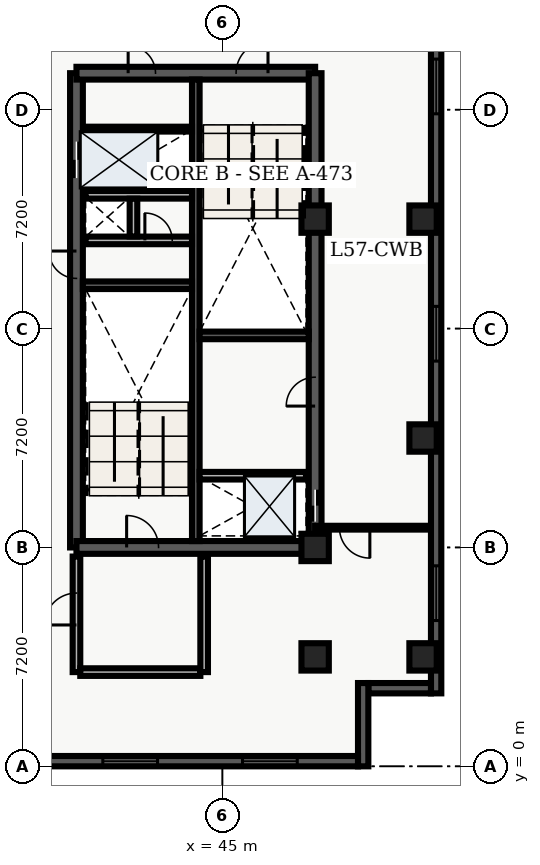
"""IFC4 building model, lengths in metres.
Left out: names, types, materials, properties, quantities, classifications, styles, units other than length and angle.
Written with IfcOpenShell. Run it as: python <this file> out.ifc"""

import sys

from ifc_helpers import new_model, entity, si_unit, converted_unit, direction, frame, origin_with_axes, origin_2d_with_axis, place, context, subcontext, project, spatial, polyline, rectangle, outline, extrude, element, fill, save


model = new_model("IFC4")
c1 = context("Model", 3, precision=1e-05, world=origin_with_axes(), true_north=direction((0.0, 1.0)))
c2 = subcontext(c1, "Body", "Model", "MODEL_VIEW")
j1 = project(units=[si_unit("LENGTHUNIT", "METRE"), converted_unit("PLANEANGLEUNIT", "DEGREE", entity("IfcPlaneAngleMeasure", 0.017), si_unit("PLANEANGLEUNIT", "RADIAN"), dimensions=[0, 0, 0, 0, 0, 0, 0])], contexts=[c1])
p1 = place(None, origin_with_axes())
s1 = spatial("IfcSite", under=j1, at=p1, CompositionType="ELEMENT")
p2 = place(p1, origin_with_axes())
s2 = spatial("IfcBuilding", under=s1, at=p2, CompositionType="ELEMENT")
p3 = place(p2, frame((0.0, 0.0, 232.5), z_axis=(0.0, 0.0, 1.0), x_axis=(1.0, 0.0, 0.0)))
s3 = spatial("IfcBuildingStorey", under=s2, at=p3, CompositionType="ELEMENT", Elevation=232.5)
p4 = place(p3, frame((40.2, 7.2, 0.0), z_axis=(0.0, 0.0, 1.0), x_axis=(0.0, 1.0, 0.0)))
e1 = element("IfcWall", 1, at=p4, inside=s3, PredefinedType="SHEAR", context=c2, shape_type="SweptSolid", body=[
    extrude(outline(polyline([(0.0, -0.21), (15.6, -0.21), (15.6, 0.21), (0.0, 0.21), (0.0, -0.21)])), origin_with_axes(), (0.0, 0.0, 1.0), 3.66),
])
p5 = place(p4, frame((12.75, 0.0, 0.0), z_axis=(0.0, 0.0, 1.0), x_axis=(1.0, 0.0, 0.0)))
e2 = element("IfcOpeningElement", 2, at=p5, cuts=e1, PredefinedType="OPENING", context=c2, shape_type="SweptSolid", body=[
    extrude(rectangle(XDim=1.2, YDim=0.44, at=origin_2d_with_axis()), origin_with_axes(), (0.0, 0.0, 1.0), 2.15),
])
p6 = place(p4, frame((9.3, 0.0, 0.0), z_axis=(0.0, 0.0, 1.0), x_axis=(1.0, 0.0, 0.0)))
e3 = element("IfcOpeningElement", 3, at=p6, cuts=e1, PredefinedType="OPENING", context=c2, shape_type="SweptSolid", body=[
    extrude(rectangle(XDim=0.9, YDim=0.44, at=origin_2d_with_axis()), origin_with_axes(), (0.0, 0.0, 1.0), 2.15),
])
p7 = place(p3, frame((40.2, 7.2, 0.0), z_axis=(0.0, 0.0, 1.0), x_axis=(1.0, 0.0, 0.0)))
e4 = element("IfcWall", 4, at=p7, inside=s3, PredefinedType="SHEAR", context=c2, shape_type="SweptSolid", body=[
    extrude(outline(polyline([(0.0, -0.21), (7.85, -0.21), (7.85, 0.21), (0.0, 0.21), (0.0, -0.21)])), origin_with_axes(), (0.0, 0.0, 1.0), 3.66),
])
p8 = place(p7, frame((2.175, 0.0, 0.0), z_axis=(0.0, 0.0, 1.0), x_axis=(1.0, 0.0, 0.0)))
e5 = element("IfcOpeningElement", 5, at=p8, cuts=e4, PredefinedType="OPENING", context=c2, shape_type="SweptSolid", body=[
    extrude(rectangle(XDim=1.05, YDim=0.44, at=origin_2d_with_axis()), origin_with_axes(), (0.0, 0.0, 1.0), 2.15),
])
p9 = place(p3, frame((40.2, 22.8, 0.0), z_axis=(0.0, 0.0, 1.0), x_axis=(1.0, 0.0, 0.0)))
e6 = element("IfcWall", 6, at=p9, inside=s3, PredefinedType="SHEAR", context=c2, shape_type="SweptSolid", body=[
    extrude(outline(polyline([(0.0, -0.21), (7.85, -0.21), (7.85, 0.21), (0.0, 0.21), (0.0, -0.21)])), origin_with_axes(), (0.0, 0.0, 1.0), 3.66),
])
p10 = place(p9, frame((5.775, 0.0, 0.0), z_axis=(0.0, 0.0, 1.0), x_axis=(1.0, 0.0, 0.0)))
e7 = element("IfcOpeningElement", 7, at=p10, cuts=e6, PredefinedType="OPENING", context=c2, shape_type="SweptSolid", body=[
    extrude(rectangle(XDim=1.05, YDim=0.44, at=origin_2d_with_axis()), origin_with_axes(), (0.0, 0.0, 1.0), 2.15),
])
p11 = place(p9, frame((2.15, 0.0, 0.0), z_axis=(0.0, 0.0, 1.0), x_axis=(1.0, 0.0, 0.0)))
e8 = element("IfcOpeningElement", 8, at=p11, cuts=e6, PredefinedType="OPENING", context=c2, shape_type="SweptSolid", body=[
    extrude(rectangle(XDim=0.9, YDim=0.44, at=origin_2d_with_axis()), origin_with_axes(), (0.0, 0.0, 1.0), 2.15),
])
p12 = place(p3, frame((48.05, 7.2, 0.0), z_axis=(0.0, 0.0, 1.0), x_axis=(0.0, 1.0, 0.0)))
e9 = element("IfcWall", 9, at=p12, inside=s3, PredefinedType="SHEAR", context=c2, shape_type="SweptSolid", body=[
    extrude(outline(polyline([(0.0, -0.21), (15.6, -0.21), (15.6, 0.21), (0.0, 0.21), (0.0, -0.21)])), origin_with_axes(), (0.0, 0.0, 1.0), 3.66),
])
p13 = place(p12, frame((1.375, 0.0, 0.0), z_axis=(0.0, 0.0, 1.0), x_axis=(1.0, 0.0, 0.0)))
e10 = element("IfcOpeningElement", 10, at=p13, cuts=e9, PredefinedType="OPENING", context=c2, shape_type="SweptSolid", body=[
    extrude(rectangle(XDim=1.05, YDim=0.44, at=origin_2d_with_axis()), origin_with_axes(), (0.0, 0.0, 1.0), 2.15),
])
p14 = place(p12, frame((5.125, 0.0, 0.0), z_axis=(0.0, 0.0, 1.0), x_axis=(1.0, 0.0, 0.0)))
e11 = element("IfcOpeningElement", 11, at=p14, cuts=e9, PredefinedType="OPENING", context=c2, shape_type="SweptSolid", body=[
    extrude(rectangle(XDim=0.95, YDim=0.44, at=origin_2d_with_axis()), origin_with_axes(), (0.0, 0.0, 1.0), 2.15),
])
p15 = place(p3, frame((44.125, 7.41, 0.0), z_axis=(0.0, 0.0, 1.0), x_axis=(0.0, 1.0, 0.0)))
e12 = element("IfcWall", 12, at=p15, inside=s3, PredefinedType="SHEAR", context=c2, shape_type="SweptSolid", body=[
    extrude(outline(polyline([(0.0, -0.125), (15.18, -0.125), (15.18, 0.125), (0.0, 0.125), (0.0, -0.125)])), origin_with_axes(), (0.0, 0.0, 1.0), 3.66),
])
for number, where, z_axis, x_axis in (
    (13, (40.41, 15.825, 0.0), (0.0, 0.0, 1.0), (1.0, 0.0, 0.0)),
    (14, (44.25, 14.175, 0.0), (0.0, 0.0, 1.0), (1.0, 0.0, 0.0)),
):
    element("IfcWall", number, at=place(p3, frame(where, z_axis=z_axis, x_axis=x_axis)), inside=s3, PredefinedType="SHEAR", context=c2, shape_type="SweptSolid", body=[
        extrude(outline(polyline([(0.0, -0.125), (3.59, -0.125), (3.59, 0.125), (0.0, 0.125), (0.0, -0.125)])), origin_with_axes(), (0.0, 0.0, 1.0), 3.66),
    ])
p16 = place(p3, frame((40.5, 17.3, 0.0), z_axis=(0.0, 0.0, 1.0), x_axis=(1.0, 0.0, 0.0)))
e15 = element("IfcWall", 15, at=p16, inside=s3, PredefinedType="SOLIDWALL", context=c2, shape_type="SweptSolid", body=[
    extrude(outline(polyline([(0.0, -0.125), (3.5, -0.125), (3.5, 0.125), (0.0, 0.125), (0.0, -0.125)])), origin_with_axes(), (0.0, 0.0, 1.0), 2.7),
])
p17 = place(p16, frame((2.4, 0.0, 0.0), z_axis=(0.0, 0.0, 1.0), x_axis=(1.0, 0.0, 0.0)))
e16 = element("IfcOpeningElement", 16, at=p17, cuts=e15, PredefinedType="OPENING", context=c2, shape_type="SweptSolid", body=[
    extrude(rectangle(XDim=0.9, YDim=0.27, at=origin_2d_with_axis()), origin_with_axes(), (0.0, 0.0, 1.0), 2.15),
])
p18 = place(p3, frame((40.5, 18.8, 0.0), z_axis=(0.0, 0.0, 1.0), x_axis=(1.0, 0.0, 0.0)))
e17 = element("IfcWall", 17, at=p18, inside=s3, PredefinedType="SOLIDWALL", context=c2, shape_type="SweptSolid", body=[
    extrude(outline(polyline([(0.0, -0.125), (3.5, -0.125), (3.5, 0.125), (0.0, 0.125), (0.0, -0.125)])), origin_with_axes(), (0.0, 0.0, 1.0), 2.7),
])
p19 = place(p3, frame((42.075, 17.43, 0.0), z_axis=(0.0, 0.0, 1.0), x_axis=(0.0, 1.0, 0.0)))
e18 = element("IfcWall", 18, at=p19, inside=s3, PredefinedType="SOLIDWALL", context=c2, shape_type="SweptSolid", body=[
    extrude(outline(polyline([(0.0, -0.125), (1.24, -0.125), (1.24, 0.125), (0.0, 0.125), (0.0, -0.125)])), origin_with_axes(), (0.0, 0.0, 1.0), 2.7),
])
p20 = place(p3, frame((40.2, 3.1, 0.0), z_axis=(0.0, 0.0, 1.0), x_axis=(0.0, 1.0, 0.0)))
e19 = element("IfcWall", 19, at=p20, inside=s3, PredefinedType="SOLIDWALL", context=c2, shape_type="SweptSolid", body=[
    extrude(outline(polyline([(0.0, -0.125), (3.8, -0.125), (3.8, 0.125), (0.0, 0.125), (0.0, -0.125)])), origin_with_axes(), (0.0, 0.0, 1.0), 2.7),
])
p21 = place(p20, frame((2.075, 0.0, 0.0), z_axis=(0.0, 0.0, 1.0), x_axis=(1.0, 0.0, 0.0)))
e20 = element("IfcOpeningElement", 20, at=p21, cuts=e19, PredefinedType="OPENING", context=c2, shape_type="SweptSolid", body=[
    extrude(rectangle(XDim=1.05, YDim=0.27, at=origin_2d_with_axis()), origin_with_axes(), (0.0, 0.0, 1.0), 2.15),
])
p22 = place(p3, frame((40.325, 3.1, 0.0), z_axis=(0.0, 0.0, 1.0), x_axis=(1.0, 0.0, 0.0)))
e21 = element("IfcWall", 21, at=p22, inside=s3, PredefinedType="SOLIDWALL", context=c2, shape_type="SweptSolid", body=[
    extrude(outline(polyline([(0.0, -0.125), (3.95, -0.125), (3.95, 0.125), (0.0, 0.125), (0.0, -0.125)])), origin_with_axes(), (0.0, 0.0, 1.0), 2.7),
])
p23 = place(p3, frame((44.4, 3.1, 0.0), z_axis=(0.0, 0.0, 1.0), x_axis=(0.0, 1.0, 0.0)))
e22 = element("IfcWall", 22, at=p23, inside=s3, PredefinedType="SOLIDWALL", context=c2, shape_type="SweptSolid", body=[
    extrude(outline(polyline([(0.0, -0.125), (3.8, -0.125), (3.8, 0.125), (0.0, 0.125), (0.0, -0.125)])), origin_with_axes(), (0.0, 0.0, 1.0), 2.7),
])
for number, where, z_axis, x_axis in (
    (23, (48.05, 3.6, 0.0), (0.0, 0.0, 1.0), (1.0, 0.0, 0.0)),
    (24, (48.05, 7.2, 0.0), (0.0, 0.0, 1.0), (1.0, 0.0, 0.0)),
    (25, (48.05, 18.0, 0.0), (0.0, 0.0, 1.0), (1.0, 0.0, 0.0)),
    (26, (51.6, 3.6, 0.0), (0.0, 0.0, 1.0), (1.0, 0.0, 0.0)),
    (27, (51.6, 10.8, 0.0), (0.0, 0.0, 1.0), (1.0, 0.0, 0.0)),
    (28, (51.6, 18.0, 0.0), (0.0, 0.0, 1.0), (1.0, 0.0, 0.0)),
):
    element("IfcColumn", number, at=place(p3, frame(where, z_axis=z_axis, x_axis=x_axis)), inside=s3, PredefinedType="COLUMN", context=c2, shape_type="SweptSolid", body=[
        extrude(rectangle(XDim=0.9, YDim=0.9, at=origin_2d_with_axis()), origin_with_axes(), (0.0, 0.0, 1.0), 3.9),
    ])
p24 = place(p3, frame((40.5, 20.96, 0.0), z_axis=(0.0, 0.0, 1.0), x_axis=(1.0, 0.0, 0.0)))
e29 = element("IfcWall", 29, at=p24, inside=s3, PredefinedType="PARTITIONING", context=c2, shape_type="SweptSolid", body=[
    extrude(outline(polyline([(0.0, -0.08), (3.5, -0.08), (3.5, 0.08), (0.0, 0.08), (0.0, -0.08)])), origin_with_axes(), (0.0, 0.0, 1.0), 2.7),
])
p25 = place(p3, frame((44.25, 9.56, 0.0), z_axis=(0.0, 0.0, 1.0), x_axis=(1.0, 0.0, 0.0)))
e30 = element("IfcWall", 30, at=p25, inside=s3, PredefinedType="SOLIDWALL", context=c2, shape_type="SweptSolid", body=[
    extrude(outline(polyline([(0.0, -0.125), (3.5, -0.125), (3.5, 0.125), (0.0, 0.125), (0.0, -0.125)])), origin_with_axes(), (0.0, 0.0, 1.0), 2.7),
])
p26 = place(p3, frame((51.865, 7.85, 0.0), z_axis=(0.0, 0.0, 1.0), x_axis=(-1.0, 0.0, 0.0)))
e31 = element("IfcWall", 31, at=p26, inside=s3, PredefinedType="PARTITIONING", context=c2, shape_type="SweptSolid", body=[
    extrude(outline(polyline([(0.0, -0.062), (3.815, -0.062), (3.815, 0.062), (0.0, 0.062), (0.0, -0.062)])), origin_with_axes(), (0.0, 0.0, 1.0), 2.7),
])
p27 = place(p26, frame((2.515, 0.0, 0.0), z_axis=(0.0, 0.0, 1.0), x_axis=(1.0, 0.0, 0.0)))
e32 = element("IfcOpeningElement", 32, at=p27, cuts=e31, PredefinedType="OPENING", context=c2, shape_type="SweptSolid", body=[
    extrude(rectangle(XDim=1.0, YDim=0.145, at=origin_2d_with_axis()), origin_with_axes(), (0.0, 0.0, 1.0), 2.15),
])
p28 = place(p3, frame((52.03, 26.06, 0.0), z_axis=(0.0, 0.0, 1.0), x_axis=(0.0, -1.0, 0.0)))
e33 = element("IfcWall", 33, at=p28, inside=s3, PredefinedType="SOLIDWALL", context=c2, shape_type="SweptSolid", body=[
    extrude(outline(polyline([(0.0, -0.17), (23.66, -0.17), (23.66, 0.17), (0.0, 0.17), (0.0, -0.17)])), origin_with_axes(), (0.0, 0.0, 1.0), 3.66),
])
p29 = place(p28, frame((3.696, 0.0, 0.45), z_axis=(0.0, 0.0, 1.0), x_axis=(1.0, 0.0, 0.0)))
e34 = element("IfcOpeningElement", 34, at=p29, cuts=e33, PredefinedType="OPENING", context=c2, shape_type="SweptSolid", body=[
    extrude(rectangle(XDim=1.8, YDim=0.36, at=origin_2d_with_axis()), origin_with_axes(), (0.0, 0.0, 1.0), 2.1),
])
p30 = place(p28, frame((11.83, 0.0, 0.45), z_axis=(0.0, 0.0, 1.0), x_axis=(1.0, 0.0, 0.0)))
e35 = element("IfcOpeningElement", 35, at=p30, cuts=e33, PredefinedType="OPENING", context=c2, shape_type="SweptSolid", body=[
    extrude(rectangle(XDim=1.8, YDim=0.36, at=origin_2d_with_axis()), origin_with_axes(), (0.0, 0.0, 1.0), 2.1),
])
p31 = place(p28, frame((20.364, 0.0, 0.45), z_axis=(0.0, 0.0, 1.0), x_axis=(1.0, 0.0, 0.0)))
e36 = element("IfcOpeningElement", 36, at=p31, cuts=e33, PredefinedType="OPENING", context=c2, shape_type="SweptSolid", body=[
    extrude(rectangle(XDim=1.8, YDim=0.36, at=origin_2d_with_axis()), origin_with_axes(), (0.0, 0.0, 1.0), 2.1),
])
p32 = place(p3, frame((51.86, 2.57, 0.0), z_axis=(0.0, 0.0, 1.0), x_axis=(-1.0, 0.0, 0.0)))
e37 = element("IfcWall", 37, at=p32, inside=s3, PredefinedType="SOLIDWALL", context=c2, shape_type="SweptSolid", body=[
    extrude(outline(polyline([(0.0, -0.17), (2.06, -0.17), (2.06, 0.17), (0.0, 0.17), (0.0, -0.17)])), origin_with_axes(), (0.0, 0.0, 1.0), 3.66),
])
p33 = place(p3, frame((49.63, 2.74, 0.0), z_axis=(0.0, 0.0, 1.0), x_axis=(0.0, -1.0, 0.0)))
e38 = element("IfcWall", 38, at=p33, inside=s3, PredefinedType="SOLIDWALL", context=c2, shape_type="SweptSolid", body=[
    extrude(outline(polyline([(0.0, -0.17), (2.74, -0.17), (2.74, 0.17), (0.0, 0.17), (0.0, -0.17)])), origin_with_axes(), (0.0, 0.0, 1.0), 3.66),
])
p34 = place(p3, frame((49.46, 0.17, 0.0), z_axis=(0.0, 0.0, 1.0), x_axis=(-1.0, 0.0, 0.0)))
e39 = element("IfcWall", 39, at=p34, inside=s3, PredefinedType="SOLIDWALL", context=c2, shape_type="SweptSolid", body=[
    extrude(outline(polyline([(0.0, -0.17), (42.56, -0.17), (42.56, 0.17), (0.0, 0.17), (0.0, -0.17)])), origin_with_axes(), (0.0, 0.0, 1.0), 3.66),
])
p35 = place(p34, frame((2.898, 0.0, 0.45), z_axis=(0.0, 0.0, 1.0), x_axis=(1.0, 0.0, 0.0)))
e40 = element("IfcOpeningElement", 40, at=p35, cuts=e39, PredefinedType="OPENING", context=c2, shape_type="SweptSolid", body=[
    extrude(rectangle(XDim=1.8, YDim=0.36, at=origin_2d_with_axis()), origin_with_axes(), (0.0, 0.0, 1.0), 2.1),
])
p36 = place(p34, frame((7.493, 0.0, 0.45), z_axis=(0.0, 0.0, 1.0), x_axis=(1.0, 0.0, 0.0)))
e41 = element("IfcOpeningElement", 41, at=p36, cuts=e39, PredefinedType="OPENING", context=c2, shape_type="SweptSolid", body=[
    extrude(rectangle(XDim=1.8, YDim=0.36, at=origin_2d_with_axis()), origin_with_axes(), (0.0, 0.0, 1.0), 2.1),
])
p37 = place(p34, frame((12.089, 0.0, 0.45), z_axis=(0.0, 0.0, 1.0), x_axis=(1.0, 0.0, 0.0)))
e42 = element("IfcOpeningElement", 42, at=p37, cuts=e39, PredefinedType="OPENING", context=c2, shape_type="SweptSolid", body=[
    extrude(rectangle(XDim=1.8, YDim=0.36, at=origin_2d_with_axis()), origin_with_axes(), (0.0, 0.0, 1.0), 2.1),
])
p38 = place(p34, frame((16.684, 0.0, 0.45), z_axis=(0.0, 0.0, 1.0), x_axis=(1.0, 0.0, 0.0)))
e43 = element("IfcOpeningElement", 43, at=p38, cuts=e39, PredefinedType="OPENING", context=c2, shape_type="SweptSolid", body=[
    extrude(rectangle(XDim=1.8, YDim=0.36, at=origin_2d_with_axis()), origin_with_axes(), (0.0, 0.0, 1.0), 2.1),
])
p39 = place(p34, frame((21.28, 0.0, 0.45), z_axis=(0.0, 0.0, 1.0), x_axis=(1.0, 0.0, 0.0)))
e44 = element("IfcOpeningElement", 44, at=p39, cuts=e39, PredefinedType="OPENING", context=c2, shape_type="SweptSolid", body=[
    extrude(rectangle(XDim=1.8, YDim=0.36, at=origin_2d_with_axis()), origin_with_axes(), (0.0, 0.0, 1.0), 2.1),
])
p40 = place(p34, frame((26.326, 0.0, 0.45), z_axis=(0.0, 0.0, 1.0), x_axis=(1.0, 0.0, 0.0)))
e45 = element("IfcOpeningElement", 45, at=p40, cuts=e39, PredefinedType="OPENING", context=c2, shape_type="SweptSolid", body=[
    extrude(rectangle(XDim=1.8, YDim=0.36, at=origin_2d_with_axis()), origin_with_axes(), (0.0, 0.0, 1.0), 2.1),
])
p41 = place(p34, frame((30.471, 0.0, 0.45), z_axis=(0.0, 0.0, 1.0), x_axis=(1.0, 0.0, 0.0)))
e46 = element("IfcOpeningElement", 46, at=p41, cuts=e39, PredefinedType="OPENING", context=c2, shape_type="SweptSolid", body=[
    extrude(rectangle(XDim=1.8, YDim=0.36, at=origin_2d_with_axis()), origin_with_axes(), (0.0, 0.0, 1.0), 2.1),
])
p42 = place(p34, frame((35.917, 0.0, 0.45), z_axis=(0.0, 0.0, 1.0), x_axis=(1.0, 0.0, 0.0)))
e47 = element("IfcOpeningElement", 47, at=p42, cuts=e39, PredefinedType="OPENING", context=c2, shape_type="SweptSolid", body=[
    extrude(rectangle(XDim=1.8, YDim=0.36, at=origin_2d_with_axis()), origin_with_axes(), (0.0, 0.0, 1.0), 2.1),
])
p43 = place(p34, frame((40.112, 0.0, 0.45), z_axis=(0.0, 0.0, 1.0), x_axis=(1.0, 0.0, 0.0)))
e48 = element("IfcOpeningElement", 48, at=p43, cuts=e39, PredefinedType="OPENING", context=c2, shape_type="SweptSolid", body=[
    extrude(rectangle(XDim=1.8, YDim=0.36, at=origin_2d_with_axis()), origin_with_axes(), (0.0, 0.0, 1.0), 2.1),
])
p44 = place(p12, frame((1.375, 0.0, 0.0), z_axis=(0.0, 0.0, 1.0), x_axis=(1.0, 0.0, 0.0)))
e49 = element("IfcDoor", 49, at=p44, inside=s3, OperationType="SLIDING_TO_LEFT", PredefinedType="DOOR", context=c2, shape_type="SweptSolid", body=[
    extrude(rectangle(XDim=1.05, YDim=0.09, at=origin_2d_with_axis()), origin_with_axes(), (0.0, 0.0, 1.0), 2.15),
])
fill(e10, e49)
p45 = place(p4, frame((12.75, 0.0, 0.0), z_axis=(0.0, 0.0, 1.0), x_axis=(1.0, 0.0, 0.0)))
e50 = element("IfcDoor", 50, at=p45, inside=s3, OperationType="DOUBLE_DOOR_SLIDING", PredefinedType="DOOR", context=c2, shape_type="SweptSolid", body=[
    extrude(rectangle(XDim=1.2, YDim=0.09, at=origin_2d_with_axis()), origin_with_axes(), (0.0, 0.0, 1.0), 2.15),
])
fill(e2, e50)
p46 = place(p4, frame((9.3, 0.0, 0.0), z_axis=(0.0, 0.0, 1.0), x_axis=(1.0, 0.0, 0.0)))
e51 = element("IfcDoor", 51, at=p46, inside=s3, OperationType="SINGLE_SWING_RIGHT", PredefinedType="DOOR", context=c2, shape_type="SweptSolid", body=[
    extrude(rectangle(XDim=0.9, YDim=0.09, at=origin_2d_with_axis()), origin_with_axes(), (0.0, 0.0, 1.0), 2.15),
])
fill(e3, e51)
p47 = place(p16, frame((2.4, 0.0, 0.0), z_axis=(0.0, 0.0, 1.0), x_axis=(1.0, 0.0, 0.0)))
e52 = element("IfcDoor", 52, at=p47, inside=s3, OperationType="SINGLE_SWING_LEFT", PredefinedType="DOOR", context=c2, shape_type="SweptSolid", body=[
    extrude(rectangle(XDim=0.9, YDim=0.09, at=origin_2d_with_axis()), origin_with_axes(), (0.0, 0.0, 1.0), 2.15),
])
fill(e16, e52)
p48 = place(p7, frame((2.175, 0.0, 0.0), z_axis=(0.0, 0.0, 1.0), x_axis=(1.0, 0.0, 0.0)))
e53 = element("IfcDoor", 53, at=p48, inside=s3, OperationType="SINGLE_SWING_LEFT", PredefinedType="DOOR", context=c2, shape_type="SweptSolid", body=[
    extrude(rectangle(XDim=1.05, YDim=0.09, at=origin_2d_with_axis()), origin_with_axes(), (0.0, 0.0, 1.0), 2.15),
])
fill(e5, e53)
p49 = place(p9, frame((5.775, 0.0, 0.0), z_axis=(0.0, 0.0, 1.0), x_axis=(1.0, 0.0, 0.0)))
e54 = element("IfcDoor", 54, at=p49, inside=s3, OperationType="SINGLE_SWING_RIGHT", PredefinedType="DOOR", context=c2, shape_type="SweptSolid", body=[
    extrude(rectangle(XDim=1.05, YDim=0.09, at=origin_2d_with_axis()), origin_with_axes(), (0.0, 0.0, 1.0), 2.15),
])
fill(e7, e54)
p50 = place(p20, frame((2.075, 0.0, 0.0), z_axis=(0.0, 0.0, 1.0), x_axis=(1.0, 0.0, 0.0)))
e55 = element("IfcDoor", 55, at=p50, inside=s3, OperationType="SINGLE_SWING_LEFT", PredefinedType="DOOR", context=c2, shape_type="SweptSolid", body=[
    extrude(rectangle(XDim=1.05, YDim=0.09, at=origin_2d_with_axis()), origin_with_axes(), (0.0, 0.0, 1.0), 2.15),
])
fill(e20, e55)
p51 = place(p9, frame((2.15, 0.0, 0.0), z_axis=(0.0, 0.0, 1.0), x_axis=(1.0, 0.0, 0.0)))
e56 = element("IfcDoor", 56, at=p51, inside=s3, OperationType="SINGLE_SWING_LEFT", PredefinedType="DOOR", context=c2, shape_type="SweptSolid", body=[
    extrude(rectangle(XDim=0.9, YDim=0.09, at=origin_2d_with_axis()), origin_with_axes(), (0.0, 0.0, 1.0), 2.15),
])
fill(e8, e56)
p52 = place(p12, frame((5.125, 0.0, 0.0), z_axis=(0.0, 0.0, 1.0), x_axis=(1.0, 0.0, 0.0)))
e57 = element("IfcDoor", 57, at=p52, inside=s3, OperationType="SINGLE_SWING_LEFT", PredefinedType="DOOR", context=c2, shape_type="SweptSolid", body=[
    extrude(rectangle(XDim=0.95, YDim=0.09, at=origin_2d_with_axis()), origin_with_axes(), (0.0, 0.0, 1.0), 2.15),
])
fill(e11, e57)
p53 = place(p26, frame((2.515, 0.0, 0.0), z_axis=(0.0, 0.0, 1.0), x_axis=(1.0, 0.0, 0.0)))
e58 = element("IfcDoor", 58, at=p53, inside=s3, OperationType="SINGLE_SWING_LEFT", PredefinedType="DOOR", context=c2, shape_type="SweptSolid", body=[
    extrude(rectangle(XDim=1.0, YDim=0.075, at=origin_2d_with_axis()), origin_with_axes(), (0.0, 0.0, 1.0), 2.15),
])
fill(e32, e58)
p54 = place(p28, frame((3.696, 0.0, 0.45), z_axis=(0.0, 0.0, 1.0), x_axis=(1.0, 0.0, 0.0)))
e59 = element("IfcWindow", 59, at=p54, inside=s3, PredefinedType="WINDOW", context=c2, shape_type="SweptSolid", body=[
    extrude(rectangle(XDim=1.8, YDim=0.09, at=origin_2d_with_axis()), origin_with_axes(), (0.0, 0.0, 1.0), 2.1),
])
fill(e34, e59)
p55 = place(p28, frame((11.83, 0.0, 0.45), z_axis=(0.0, 0.0, 1.0), x_axis=(1.0, 0.0, 0.0)))
e60 = element("IfcWindow", 60, at=p55, inside=s3, PredefinedType="WINDOW", context=c2, shape_type="SweptSolid", body=[
    extrude(rectangle(XDim=1.8, YDim=0.09, at=origin_2d_with_axis()), origin_with_axes(), (0.0, 0.0, 1.0), 2.1),
])
fill(e35, e60)
p56 = place(p28, frame((20.364, 0.0, 0.45), z_axis=(0.0, 0.0, 1.0), x_axis=(1.0, 0.0, 0.0)))
e61 = element("IfcWindow", 61, at=p56, inside=s3, PredefinedType="WINDOW", context=c2, shape_type="SweptSolid", body=[
    extrude(rectangle(XDim=1.8, YDim=0.09, at=origin_2d_with_axis()), origin_with_axes(), (0.0, 0.0, 1.0), 2.1),
])
fill(e36, e61)
p57 = place(p34, frame((2.898, 0.0, 0.45), z_axis=(0.0, 0.0, 1.0), x_axis=(1.0, 0.0, 0.0)))
e62 = element("IfcWindow", 62, at=p57, inside=s3, PredefinedType="WINDOW", context=c2, shape_type="SweptSolid", body=[
    extrude(rectangle(XDim=1.8, YDim=0.09, at=origin_2d_with_axis()), origin_with_axes(), (0.0, 0.0, 1.0), 2.1),
])
fill(e40, e62)
p58 = place(p34, frame((7.493, 0.0, 0.45), z_axis=(0.0, 0.0, 1.0), x_axis=(1.0, 0.0, 0.0)))
e63 = element("IfcWindow", 63, at=p58, inside=s3, PredefinedType="WINDOW", context=c2, shape_type="SweptSolid", body=[
    extrude(rectangle(XDim=1.8, YDim=0.09, at=origin_2d_with_axis()), origin_with_axes(), (0.0, 0.0, 1.0), 2.1),
])
fill(e41, e63)
save(model, sys.argv[1])
